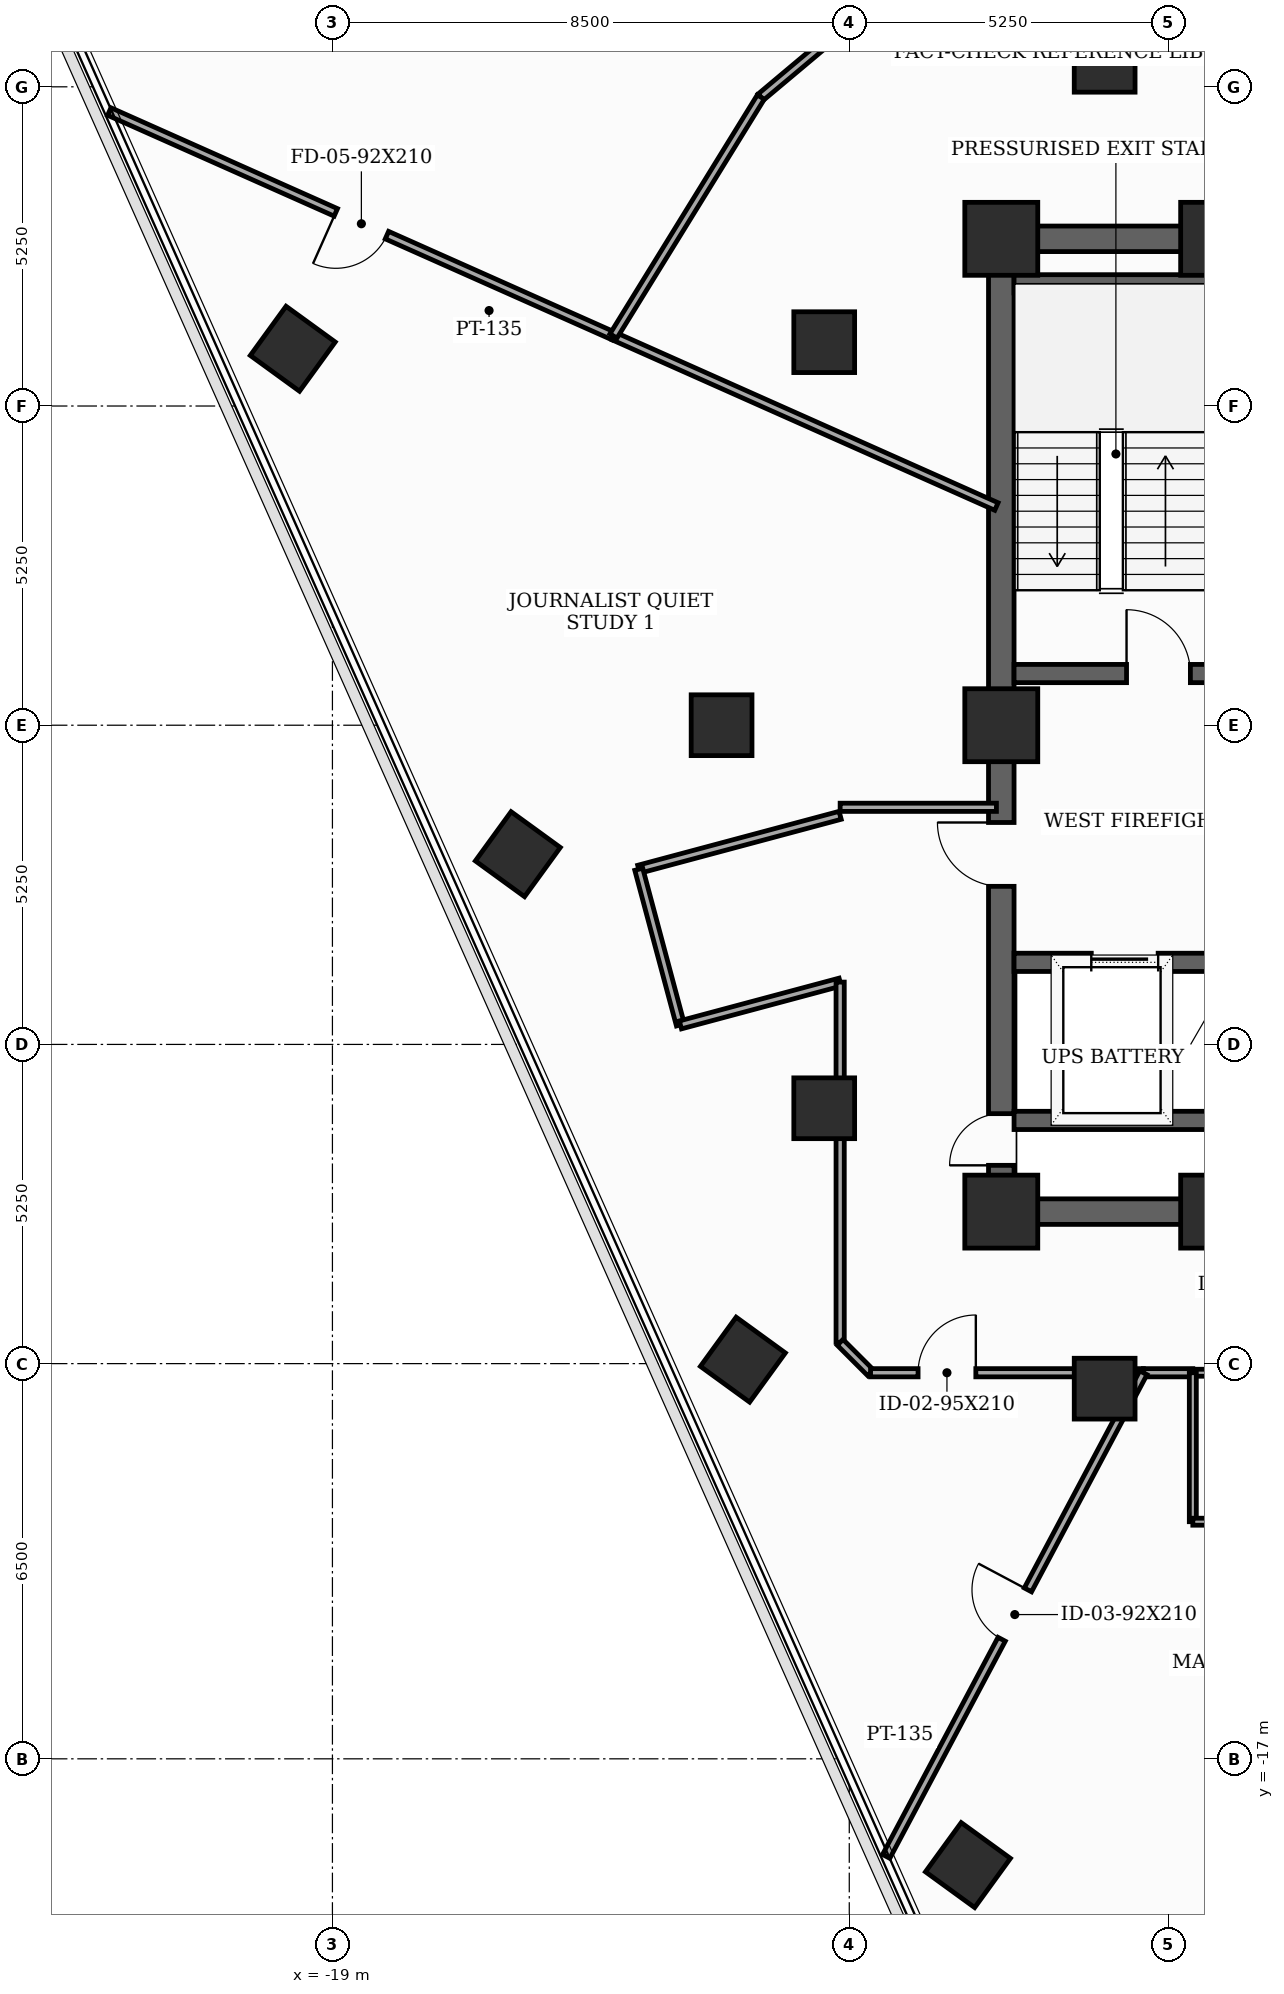
"""IFC4 building model, lengths in metres.
Left out: names, types, materials, properties, quantities, classifications, styles, units other than length and angle.
Written with IfcOpenShell. Run it as: python <this file> out.ifc"""

import sys

from ifc_helpers import new_model, si_unit, direction, frame, frame_2d, origin, origin_2d, place, context, subcontext, project, spatial, rectangle, extrude, element, fill, save


model = new_model("IFC4")
c1 = context("Model", 3, precision=1e-05, world=origin(), true_north=direction((0.0, 1.0)))
c2 = subcontext(c1, "Body", "Model", "MODEL_VIEW")
j1 = project(units=[si_unit("LENGTHUNIT", "METRE"), si_unit("PLANEANGLEUNIT", "RADIAN")], contexts=[c1])
p1 = place(None, origin())
s1 = spatial("IfcSite", under=j1, at=p1, CompositionType="ELEMENT")
p2 = place(p1, origin())
s2 = spatial("IfcBuilding", under=s1, at=p2, CompositionType="ELEMENT")
p3 = place(p2, frame((0.0, 0.0, 230.0)))
s3 = spatial("IfcBuildingStorey", under=s2, at=p3, CompositionType="ELEMENT", Elevation=230.0)
for number, where, z_axis, x_axis in (
    (1, (-8.0, -8.0, 0.0), (0.0, 0.0, 1.0), (1.0, 0.0, 0.0)),
    (2, (-4.45, -8.0, 0.0), (0.0, 0.0, 1.0), (1.0, 0.0, 0.0)),
    (3, (-4.45, 8.0, 0.0), (0.0, 0.0, 1.0), (1.0, 0.0, 0.0)),
    (4, (-8.0, 8.0, 0.0), (0.0, 0.0, 1.0), (1.0, 0.0, 0.0)),
    (5, (-8.0, 0.0, 0.0), (0.0, 0.0, 1.0), (1.0, 0.0, 0.0)),
):
    element("IfcColumn", number, at=place(p3, frame(where, z_axis=z_axis, x_axis=x_axis)), inside=s3, PredefinedType="COLUMN", context=c2, shape_type="SweptSolid", body=[
        extrude(rectangle(XDim=1.2, YDim=1.2, at=origin_2d()), origin(), (0.0, 0.0, 1.0), 3.7),
    ])
for number, where, z_axis, x_axis in (
    (6, (-6.3, 10.912, 0.0), (0.0, 0.0, 1.0), (1.0, 0.0, 0.0)),
    (7, (-10.912, 6.3, 0.0), (0.0, 0.0, 1.0), (1.0, 0.0, 0.0)),
    (8, (-12.6, 0.0, 0.0), (0.0, 0.0, 1.0), (1.0, 0.0, 0.0)),
    (9, (-10.912, -6.3, 0.0), (0.0, 0.0, 1.0), (1.0, 0.0, 0.0)),
    (10, (-6.3, -10.912, 0.0), (0.0, 0.0, 1.0), (1.0, 0.0, 0.0)),
    (11, (-19.652, 6.192, 0.0), (0.0, 0.0, 1.0), (0.588, 0.809, 0.0)),
    (12, (-15.951, -2.121, 0.0), (0.0, 0.0, 1.0), (0.588, 0.809, 0.0)),
    (13, (-12.25, -10.435, 0.0), (0.0, 0.0, 1.0), (0.588, 0.809, 0.0)),
    (14, (-8.548, -18.748, 0.0), (0.0, 0.0, 1.0), (0.588, 0.809, 0.0)),
):
    element("IfcColumn", number, at=place(p3, frame(where, z_axis=z_axis, x_axis=x_axis)), inside=s3, PredefinedType="COLUMN", context=c2, shape_type="SweptSolid", body=[
        extrude(rectangle(XDim=1.0, YDim=1.0, at=origin_2d()), origin(), (0.0, 0.0, 1.0), 3.7),
    ])
p4 = place(p3, frame((-8.0, -8.0, 0.0), z_axis=(0.0, 0.0, 1.0), x_axis=(0.0, 1.0, 0.0)))
e15 = element("IfcWall", 15, at=p4, inside=s3, PredefinedType="SHEAR", context=c2, shape_type="SweptSolid", body=[
    extrude(rectangle(XDim=16.0, YDim=0.42, at=frame_2d((8.0, 0.0))), origin(), (0.0, 0.0, 1.0), 3.5),
])
p5 = place(p4, frame((0.761, 0.0, 0.0)))
e16 = element("IfcOpeningElement", 16, at=p5, cuts=e15, PredefinedType="OPENING", context=c2, shape_type="SweptSolid", body=[
    extrude(rectangle(XDim=0.85, YDim=2.02, at=frame_2d((0.425, 1.01))), frame((0.0, 0.22, 0.0), z_axis=(0.0, -1.0, 0.0), x_axis=(1.0, 0.0, 0.0)), (0.0, 0.0, 1.0), 0.44),
])
p6 = place(p4, frame((5.35, 0.0, 0.0)))
e17 = element("IfcOpeningElement", 17, at=p6, cuts=e15, PredefinedType="OPENING", context=c2, shape_type="SweptSolid", body=[
    extrude(rectangle(XDim=1.05, YDim=2.15, at=frame_2d((0.525, 1.075))), frame((0.0, 0.22, 0.0), z_axis=(0.0, -1.0, 0.0), x_axis=(1.0, 0.0, 0.0)), (0.0, 0.0, 1.0), 0.44),
])
p7 = place(p3, frame((-8.0, -8.0, 0.0), z_axis=(0.0, 0.0, 1.0), x_axis=(1.0, 0.0, 0.0)))
e18 = element("IfcWall", 18, at=p7, inside=s3, PredefinedType="SHEAR", context=c2, shape_type="SweptSolid", body=[
    extrude(rectangle(XDim=16.0, YDim=0.42, at=frame_2d((8.0, 0.0))), origin(), (0.0, 0.0, 1.0), 3.5),
])
p8 = place(p7, frame((5.2, 0.0, 0.0)))
e19 = element("IfcOpeningElement", 19, at=p8, cuts=e18, PredefinedType="OPENING", context=c2, shape_type="SweptSolid", body=[
    extrude(rectangle(XDim=0.95, YDim=2.1, at=frame_2d((0.475, 1.05))), frame((0.0, 0.22, 0.0), z_axis=(0.0, -1.0, 0.0), x_axis=(1.0, 0.0, 0.0)), (0.0, 0.0, 1.0), 0.44),
])
p9 = place(p7, frame((9.8, 0.0, 0.0)))
e20 = element("IfcOpeningElement", 20, at=p9, cuts=e18, PredefinedType="OPENING", context=c2, shape_type="SweptSolid", body=[
    extrude(rectangle(XDim=0.95, YDim=2.1, at=frame_2d((0.475, 1.05))), frame((0.0, 0.22, 0.0), z_axis=(0.0, -1.0, 0.0), x_axis=(1.0, 0.0, 0.0)), (0.0, 0.0, 1.0), 0.44),
])
p10 = place(p3, frame((-8.0, 8.0, 0.0), z_axis=(0.0, 0.0, 1.0), x_axis=(1.0, 0.0, 0.0)))
e21 = element("IfcWall", 21, at=p10, inside=s3, PredefinedType="SHEAR", context=c2, shape_type="SweptSolid", body=[
    extrude(rectangle(XDim=16.0, YDim=0.42, at=frame_2d((8.0, 0.0))), origin(), (0.0, 0.0, 1.0), 3.5),
])
p11 = place(p10, frame((7.1, 0.0, 0.0)))
e22 = element("IfcOpeningElement", 22, at=p11, cuts=e21, PredefinedType="OPENING", context=c2, shape_type="SweptSolid", body=[
    extrude(rectangle(XDim=1.8, YDim=2.15, at=frame_2d((0.9, 1.075))), frame((0.0, 0.22, 0.0), z_axis=(0.0, -1.0, 0.0), x_axis=(1.0, 0.0, 0.0)), (0.0, 0.0, 1.0), 0.44),
])
p12 = place(p3, frame((-7.79, 0.85, 0.0), z_axis=(0.0, 0.0, 1.0), x_axis=(1.0, 0.0, 0.0)))
e23 = element("IfcWall", 23, at=p12, inside=s3, PredefinedType="SHEAR", context=c2, shape_type="SweptSolid", body=[
    extrude(rectangle(XDim=3.34, YDim=0.3, at=frame_2d((1.67, 0.0))), origin(), (0.0, 0.0, 1.0), 3.5),
])
p13 = place(p12, frame((1.85, 0.0, 0.0)))
e24 = element("IfcOpeningElement", 24, at=p13, cuts=e23, PredefinedType="OPENING", context=c2, shape_type="SweptSolid", body=[
    extrude(rectangle(XDim=1.05, YDim=2.15, at=frame_2d((0.525, 1.075))), frame((0.0, 0.16, 0.0), z_axis=(0.0, -1.0, 0.0), x_axis=(1.0, 0.0, 0.0)), (0.0, 0.0, 1.0), 0.32),
])
p14 = place(p3, frame((-7.79, 7.26, 0.0), z_axis=(0.0, 0.0, 1.0), x_axis=(1.0, 0.0, 0.0)))
e25 = element("IfcWall", 25, at=p14, inside=s3, PredefinedType="SHEAR", context=c2, shape_type="SweptSolid", body=[
    extrude(rectangle(XDim=3.34, YDim=0.3, at=frame_2d((1.67, 0.0))), origin(), (0.0, 0.0, 1.0), 3.5),
])
p15 = place(p3, frame((-7.79, -3.9, 0.0), z_axis=(0.0, 0.0, 1.0), x_axis=(1.0, 0.0, 0.0)))
e26 = element("IfcWall", 26, at=p15, inside=s3, PredefinedType="SHEAR", context=c2, shape_type="SweptSolid", body=[
    extrude(rectangle(XDim=3.34, YDim=0.3, at=frame_2d((1.67, 0.0))), origin(), (0.0, 0.0, 1.0), 3.5),
])
p16 = place(p15, frame((1.27, 0.0, 0.0)))
e27 = element("IfcOpeningElement", 27, at=p16, cuts=e26, PredefinedType="OPENING", context=c2, shape_type="SweptSolid", body=[
    extrude(rectangle(XDim=1.1, YDim=2.1, at=frame_2d((0.55, 1.05))), frame((0.0, 0.16, 0.0), z_axis=(0.0, -1.0, 0.0), x_axis=(1.0, 0.0, 0.0)), (0.0, 0.0, 1.0), 0.32),
])
p17 = place(p3, frame((-7.79, -6.5, 0.0), z_axis=(0.0, 0.0, 1.0), x_axis=(1.0, 0.0, 0.0)))
e28 = element("IfcWall", 28, at=p17, inside=s3, PredefinedType="SHEAR", context=c2, shape_type="SweptSolid", body=[
    extrude(rectangle(XDim=3.34, YDim=0.3, at=frame_2d((1.67, 0.0))), origin(), (0.0, 0.0, 1.0), 3.5),
])
p18 = place(p3, frame((-8.08, -1.35, 0.0), z_axis=(0.0, 0.0, 1.0), x_axis=(-1.0, 0.0, 0.0)))
e29 = element("IfcWall", 29, at=p18, inside=s3, PredefinedType="PARTITIONING", context=c2, shape_type="SweptSolid", body=[
    extrude(rectangle(XDim=2.57, YDim=0.135, at=frame_2d((1.285, 0.0))), origin(), (0.0, 0.0, 1.0), 2.885),
])
p19 = place(p3, frame((-10.65, -1.482, 0.0), z_axis=(0.0, 0.0, 1.0), x_axis=(-0.965961397105, -0.2586862565, 0.0)))
e30 = element("IfcWall", 30, at=p19, inside=s3, PredefinedType="PARTITIONING", context=c2, shape_type="SweptSolid", body=[
    extrude(rectangle(XDim=3.429, YDim=0.135, at=frame_2d((1.714, 0.0))), origin(), (0.0, 0.0, 1.0), 2.885),
])
p20 = place(p3, frame((-13.962, -2.369, 0.0), z_axis=(0.0, 0.0, 1.0), x_axis=(0.258413725385, -0.966034340245, 0.0)))
e31 = element("IfcWall", 31, at=p20, inside=s3, PredefinedType="PARTITIONING", context=c2, shape_type="SweptSolid", body=[
    extrude(rectangle(XDim=2.65, YDim=0.135, at=frame_2d((1.325, 0.0))), origin(), (0.0, 0.0, 1.0), 3.5),
])
p21 = place(p3, frame((-13.277, -4.929, 0.0), z_axis=(0.0, 0.0, 1.0), x_axis=(0.965934830229, 0.258785439601, 0.0)))
e32 = element("IfcWall", 32, at=p21, inside=s3, PredefinedType="PARTITIONING", context=c2, shape_type="SweptSolid", body=[
    extrude(rectangle(XDim=2.72, YDim=0.135, at=frame_2d((1.36, 0.0))), origin(), (0.0, 0.0, 1.0), 2.885),
])
p22 = place(p3, frame((-10.65, -4.225, 0.0), z_axis=(0.0, 0.0, 1.0), x_axis=(0.0, -1.0, 0.0)))
e33 = element("IfcWall", 33, at=p22, inside=s3, PredefinedType="PARTITIONING", context=c2, shape_type="SweptSolid", body=[
    extrude(rectangle(XDim=5.925, YDim=0.135, at=frame_2d((2.962, 0.0))), origin(), (0.0, 0.0, 1.0), 2.885),
])
p23 = place(p3, frame((-10.65, -10.15, 0.0), z_axis=(0.0, 0.0, 1.0), x_axis=(0.707106781187, -0.707106781187, 0.0)))
e34 = element("IfcWall", 34, at=p23, inside=s3, PredefinedType="PARTITIONING", context=c2, shape_type="SweptSolid", body=[
    extrude(rectangle(XDim=0.707, YDim=0.135, at=frame_2d((0.354, 0.0))), origin(), (0.0, 0.0, 1.0), 3.5),
])
p24 = place(p3, frame((-10.15, -10.65, 0.0), z_axis=(0.0, 0.0, 1.0), x_axis=(1.0, 0.0, 0.0)))
e35 = element("IfcWall", 35, at=p24, inside=s3, PredefinedType="PARTITIONING", context=c2, shape_type="SweptSolid", body=[
    extrude(rectangle(XDim=4.487, YDim=0.135, at=frame_2d((2.243, 0.0))), origin(), (0.0, 0.0, 1.0), 2.885),
])
p25 = place(p24, frame((0.781, 0.0, 0.0)))
e36 = element("IfcOpeningElement", 36, at=p25, cuts=e35, PredefinedType="OPENING", context=c2, shape_type="SweptSolid", body=[
    extrude(rectangle(XDim=0.95, YDim=2.1, at=frame_2d((0.475, 1.05))), frame((0.0, 0.077, 0.0), z_axis=(0.0, -1.0, 0.0), x_axis=(1.0, 0.0, 0.0)), (0.0, 0.0, 1.0), 0.155),
])
p26 = place(p3, frame((-4.85, -10.65, 0.0), z_axis=(0.0, 0.0, 1.0), x_axis=(1.0, 0.0, 0.0)))
e37 = element("IfcWall", 37, at=p26, inside=s3, PredefinedType="PARTITIONING", context=c2, shape_type="SweptSolid", body=[
    extrude(rectangle(XDim=2.4, YDim=0.115, at=frame_2d((1.2, 0.0))), origin(), (0.0, 0.0, 1.0), 3.5),
])
p27 = place(p26, frame((0.74, 0.0, 0.0)))
e38 = element("IfcOpeningElement", 38, at=p27, cuts=e37, PredefinedType="OPENING", context=c2, shape_type="SweptSolid", body=[
    extrude(rectangle(XDim=0.92, YDim=2.1, at=frame_2d((0.46, 1.05))), frame((0.0, 0.067, 0.0), z_axis=(0.0, -1.0, 0.0), x_axis=(1.0, 0.0, 0.0)), (0.0, 0.0, 1.0), 0.135),
])
p28 = place(p3, frame((-5.663, -10.65, 0.0), z_axis=(0.0, 0.0, 1.0), x_axis=(1.0, 0.0, 0.0)))
e39 = element("IfcWall", 39, at=p28, inside=s3, PredefinedType="PARTITIONING", context=c2, shape_type="SweptSolid", body=[
    extrude(rectangle(XDim=0.813, YDim=0.135, at=frame_2d((0.406, 0.0))), origin(), (0.0, 0.0, 1.0), 3.5),
])
p29 = place(p3, frame((-9.893, -18.605, 0.0), z_axis=(0.0, 0.0, 1.0), x_axis=(0.469478145305, 0.88294409284, 0.0)))
e40 = element("IfcWall", 40, at=p29, inside=s3, PredefinedType="PARTITIONING", context=c2, shape_type="SweptSolid", body=[
    extrude(rectangle(XDim=9.01, YDim=0.135, at=frame_2d((4.505, 0.0))), origin(), (0.0, 0.0, 1.0), 2.885),
])
p30 = place(p29, frame((4.045, 0.0, 0.0)))
e41 = element("IfcOpeningElement", 41, at=p30, cuts=e40, PredefinedType="OPENING", context=c2, shape_type="SweptSolid", body=[
    extrude(rectangle(XDim=0.92, YDim=2.1, at=frame_2d((0.46, 1.05))), frame((0.0, 0.077, 0.0), z_axis=(0.0, -1.0, 0.0), x_axis=(1.0, 0.0, 0.0)), (0.0, 0.0, 1.0), 0.155),
])
p31 = place(p3, frame((-8.08, 3.597, 0.0), z_axis=(0.0, 0.0, 1.0), x_axis=(-0.913494385598, 0.40685133339, 0.0)))
e42 = element("IfcWall", 42, at=p31, inside=s3, PredefinedType="PARTITIONING", context=c2, shape_type="SweptSolid", body=[
    extrude(rectangle(XDim=6.894, YDim=0.135, at=frame_2d((3.447, 0.0))), origin(), (0.0, 0.0, 1.0), 2.885),
])
p32 = place(p3, frame((-14.378, 6.402, 0.0), z_axis=(0.0, 0.0, 1.0), x_axis=(-0.913562917951, 0.406697424315, 0.0)))
e43 = element("IfcWall", 43, at=p32, inside=s3, PredefinedType="PARTITIONING", context=c2, shape_type="SweptSolid", body=[
    extrude(rectangle(XDim=9.077, YDim=0.135, at=frame_2d((4.538, 0.0))), origin(), (0.0, 0.0, 1.0), 2.985),
])
p33 = place(p32, frame((4.078, 0.0, 0.0)))
e44 = element("IfcOpeningElement", 44, at=p33, cuts=e43, PredefinedType="OPENING", context=c2, shape_type="SweptSolid", body=[
    extrude(rectangle(XDim=0.92, YDim=2.1, at=frame_2d((0.46, 1.05))), frame((0.0, 0.077, 0.0), z_axis=(0.0, -1.0, 0.0), x_axis=(1.0, 0.0, 0.0)), (0.0, 0.0, 1.0), 0.155),
])
p34 = place(p3, frame((-4.85, -10.65, 0.0), z_axis=(0.0, 0.0, 1.0), x_axis=(0.0, -1.0, 0.0)))
e45 = element("IfcWall", 45, at=p34, inside=s3, PredefinedType="PARTITIONING", context=c2, shape_type="SweptSolid", body=[
    extrude(rectangle(XDim=2.45, YDim=0.115, at=frame_2d((1.225, 0.0))), origin(), (0.0, 0.0, 1.0), 2.885),
])
p35 = place(p3, frame((-4.85, -13.1, 0.0), z_axis=(0.0, 0.0, 1.0), x_axis=(1.0, 0.0, 0.0)))
e46 = element("IfcWall", 46, at=p35, inside=s3, PredefinedType="PARTITIONING", context=c2, shape_type="SweptSolid", body=[
    extrude(rectangle(XDim=2.4, YDim=0.115, at=frame_2d((1.2, 0.0))), origin(), (0.0, 0.0, 1.0), 3.5),
])
p36 = place(p3, frame((-8.098, 13.567, 0.0), z_axis=(0.0, 0.0, 1.0), x_axis=(-0.766114520239, -0.642704085781, 0.0)))
e47 = element("IfcWall", 47, at=p36, inside=s3, PredefinedType="PARTITIONING", context=c2, shape_type="SweptSolid", body=[
    extrude(rectangle(XDim=5.035, YDim=0.135, at=frame_2d((2.517, 0.0))), origin(), (0.0, 0.0, 1.0), 2.985),
])
p37 = place(p3, frame((-11.955, 10.331, 0.0), z_axis=(0.0, 0.0, 1.0), x_axis=(-0.524888064347, -0.851171263557, 0.0)))
e48 = element("IfcWall", 48, at=p37, inside=s3, PredefinedType="PARTITIONING", context=c2, shape_type="SweptSolid", body=[
    extrude(rectangle(XDim=4.616, YDim=0.135, at=frame_2d((2.308, 0.0))), origin(), (0.0, 0.0, 1.0), 2.985),
])
p38 = place(p5, origin())
e49 = element("IfcDoor", 49, at=p38, inside=s3, OperationType="SINGLE_SWING_LEFT", PredefinedType="TRAPDOOR", context=c2, shape_type="SweptSolid", body=[
    extrude(rectangle(XDim=0.85, YDim=2.02, at=frame_2d((0.425, 1.01))), frame((0.0, 0.025, 0.0), z_axis=(0.0, -1.0, 0.0), x_axis=(1.0, 0.0, 0.0)), (0.0, 0.0, 1.0), 0.05),
])
fill(e16, e49)
p39 = place(p6, origin())
e50 = element("IfcDoor", 50, at=p39, inside=s3, OperationType="SINGLE_SWING_RIGHT", PredefinedType="DOOR", context=c2, shape_type="SweptSolid", body=[
    extrude(rectangle(XDim=1.05, YDim=2.15, at=frame_2d((0.525, 1.075))), frame((0.0, 0.025, 0.0), z_axis=(0.0, -1.0, 0.0), x_axis=(1.0, 0.0, 0.0)), (0.0, 0.0, 1.0), 0.05),
])
fill(e17, e50)
p40 = place(p13, origin())
e51 = element("IfcDoor", 51, at=p40, inside=s3, OperationType="SINGLE_SWING_LEFT", PredefinedType="DOOR", context=c2, shape_type="SweptSolid", body=[
    extrude(rectangle(XDim=1.05, YDim=2.15, at=frame_2d((0.525, 1.075))), frame((0.0, 0.025, 0.0), z_axis=(0.0, -1.0, 0.0), x_axis=(1.0, 0.0, 0.0)), (0.0, 0.0, 1.0), 0.05),
])
fill(e24, e51)
p41 = place(p16, origin())
e52 = element("IfcDoor", 52, at=p41, inside=s3, OperationType="SLIDING_TO_LEFT", PredefinedType="DOOR", context=c2, shape_type="SweptSolid", body=[
    extrude(rectangle(XDim=1.1, YDim=2.1, at=frame_2d((0.55, 1.05))), frame((0.0, 0.025, 0.0), z_axis=(0.0, -1.0, 0.0), x_axis=(1.0, 0.0, 0.0)), (0.0, 0.0, 1.0), 0.05),
])
fill(e27, e52)
p42 = place(p25, origin())
e53 = element("IfcDoor", 53, at=p42, inside=s3, OperationType="SINGLE_SWING_RIGHT", PredefinedType="DOOR", context=c2, shape_type="SweptSolid", body=[
    extrude(rectangle(XDim=0.95, YDim=2.1, at=frame_2d((0.475, 1.05))), frame((0.0, 0.025, 0.0), z_axis=(0.0, -1.0, 0.0), x_axis=(1.0, 0.0, 0.0)), (0.0, 0.0, 1.0), 0.05),
])
fill(e36, e53)
p43 = place(p30, origin())
e54 = element("IfcDoor", 54, at=p43, inside=s3, OperationType="SINGLE_SWING_RIGHT", PredefinedType="DOOR", context=c2, shape_type="SweptSolid", body=[
    extrude(rectangle(XDim=0.92, YDim=2.1, at=frame_2d((0.46, 1.05))), frame((0.0, 0.025, 0.0), z_axis=(0.0, -1.0, 0.0), x_axis=(1.0, 0.0, 0.0)), (0.0, 0.0, 1.0), 0.05),
])
fill(e41, e54)
p44 = place(p33, origin())
e55 = element("IfcDoor", 55, at=p44, inside=s3, OperationType="SINGLE_SWING_RIGHT", PredefinedType="DOOR", context=c2, shape_type="SweptSolid", body=[
    extrude(rectangle(XDim=0.92, YDim=2.1, at=frame_2d((0.46, 1.05))), frame((0.0, 0.025, 0.0), z_axis=(0.0, -1.0, 0.0), x_axis=(1.0, 0.0, 0.0)), (0.0, 0.0, 1.0), 0.05),
])
fill(e44, e55)
save(model, sys.argv[1])
